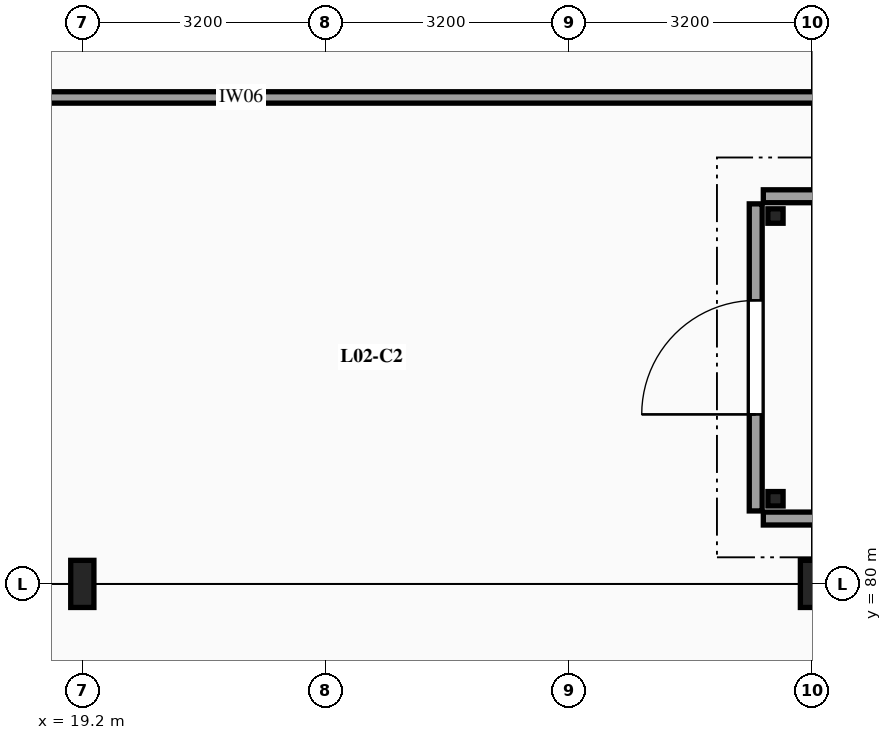
"""IFC4 building model, lengths in metres.
Left out: names, types, materials, properties, quantities, classifications, styles, units other than length and angle.
Written with IfcOpenShell. Run it as: python <this file> out.ifc"""

import sys

from ifc_helpers import new_model, si_unit, direction, frame, frame_2d, origin, origin_2d, place, context, subcontext, project, spatial, rectangle, i_section, extrude, element, fill, save


model = new_model("IFC4")
c1 = context("Model", 3, precision=1e-05, world=origin(), true_north=direction((0.0, 1.0)))
c2 = subcontext(c1, "Body", "Model", "MODEL_VIEW")
j1 = project(units=[si_unit("LENGTHUNIT", "METRE"), si_unit("PLANEANGLEUNIT", "RADIAN")], contexts=[c1])
p1 = place(None, origin())
s1 = spatial("IfcSite", under=j1, at=p1, CompositionType="ELEMENT")
p2 = place(p1, origin())
s2 = spatial("IfcBuilding", under=s1, at=p2, CompositionType="ELEMENT")
p3 = place(p2, frame((0.0, 0.0, 8.7)))
s3 = spatial("IfcBuildingStorey", under=s2, at=p3, CompositionType="ELEMENT", Elevation=8.7)
for number, where, z_axis, x_axis in (
    (1, (19.2, 80.0, -0.26), (0.0, 0.0, 1.0), (1.0, 0.0, 0.0)),
    (2, (28.8, 80.0, -0.26), (0.0, 0.0, 1.0), (1.0, 0.0, 0.0)),
):
    element("IfcColumn", number, at=place(p3, frame(where, z_axis=z_axis, x_axis=x_axis)), inside=s3, PredefinedType="COLUMN", context=c2, shape_type="SweptSolid", body=[
        extrude(i_section(OverallWidth=0.305, OverallDepth=0.62, WebThickness=0.021, FlangeThickness=0.04, FilletRadius=0.027, at=origin_2d()), origin(), (0.0, 0.0, 1.0), 4.2),
    ])
for number, where, z_axis, x_axis in (
    (3, (28.32, 81.12, 0.0), (0.0, 0.0, 1.0), (1.0, 0.0, 0.0)),
    (4, (28.32, 84.84, 0.0), (0.0, 0.0, 1.0), (1.0, 0.0, 0.0)),
):
    element("IfcColumn", number, at=place(p3, frame(where, z_axis=z_axis, x_axis=x_axis)), inside=s3, PredefinedType="COLUMN", context=c2, shape_type="SweptSolid", body=[
        extrude(i_section(OverallWidth=0.2, OverallDepth=0.19, WebThickness=0.007, FlangeThickness=0.01, FilletRadius=0.018, at=origin_2d()), origin(), (0.0, 0.0, 1.0), 4.2),
    ])
p4 = place(p3, frame((28.06, 80.96, 0.0), z_axis=(0.0, 0.0, 1.0), x_axis=(0.0, 1.0, 0.0)))
e5 = element("IfcWall", 5, at=p4, inside=s3, PredefinedType="SOLIDWALL", context=c2, shape_type="SweptSolid", body=[
    extrude(rectangle(XDim=4.04, YDim=0.17, at=frame_2d((2.02, 0.0))), origin(), (0.0, 0.0, 1.0), 3.1),
])
p5 = place(p4, frame((1.27, 0.0, 0.0)))
e6 = element("IfcOpeningElement", 6, at=p5, cuts=e5, PredefinedType="OPENING", context=c2, shape_type="SweptSolid", body=[
    extrude(rectangle(XDim=1.5, YDim=2.2, at=frame_2d((0.75, 1.1))), frame((0.0, 0.095, 0.0), z_axis=(0.0, -1.0, 0.0), x_axis=(1.0, 0.0, 0.0)), (0.0, 0.0, 1.0), 0.19),
])
for number, where, z_axis, x_axis in (
    (7, (28.16, 80.86, 0.0), (0.0, 0.0, 1.0), (1.0, 0.0, 0.0)),
    (8, (28.16, 85.1, 0.0), (0.0, 0.0, 1.0), (1.0, 0.0, 0.0)),
):
    element("IfcWall", number, at=place(p3, frame(where, z_axis=z_axis, x_axis=x_axis)), inside=s3, PredefinedType="SOLIDWALL", context=c2, shape_type="SweptSolid", body=[
        extrude(rectangle(XDim=10.0, YDim=0.17, at=frame_2d((5.0, 0.0))), origin(), (0.0, 0.0, 1.0), 3.1),
    ])
p6 = place(p3, frame((10.14, 86.4, 0.0), z_axis=(0.0, 0.0, 1.0), x_axis=(1.0, 0.0, 0.0)))
e9 = element("IfcWall", 9, at=p6, inside=s3, PredefinedType="PARTITIONING", context=c2, shape_type="SweptSolid", body=[
    extrude(rectangle(XDim=27.72, YDim=0.15, at=frame_2d((13.86, 0.0))), origin(), (0.0, 0.0, 1.0), 3.1),
])
p7 = place(p6, frame((22.546, 0.0, 0.0)))
e10 = element("IfcOpeningElement", 10, at=p7, cuts=e9, PredefinedType="OPENING", context=c2, shape_type="SweptSolid", body=[
    extrude(rectangle(XDim=1.85, YDim=2.5, at=frame_2d((0.925, 1.25))), frame((0.0, 0.085, 0.0), z_axis=(0.0, -1.0, 0.0), x_axis=(1.0, 0.0, 0.0)), (0.0, 0.0, 1.0), 0.17),
])
p8 = place(p5, origin())
e11 = element("IfcDoor", 11, at=p8, inside=s3, OperationType="SINGLE_SWING_LEFT", PredefinedType="DOOR", context=c2, shape_type="SweptSolid", body=[
    extrude(rectangle(XDim=1.5, YDim=2.2, at=frame_2d((0.75, 1.1))), frame((0.0, 0.025, 0.0), z_axis=(0.0, -1.0, 0.0), x_axis=(1.0, 0.0, 0.0)), (0.0, 0.0, 1.0), 0.05),
])
fill(e6, e11)
save(model, sys.argv[1])
